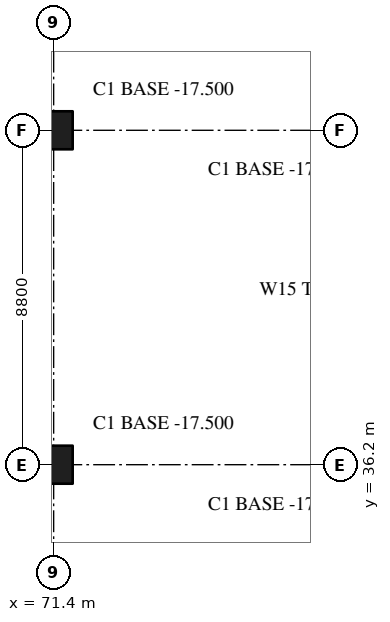
"""IFC4 building model, lengths in metres.
Left out: names, types, materials, properties, quantities, classifications, styles, units other than length and angle.
Written with IfcOpenShell. Run it as: python <this file> out.ifc"""

import sys

from ifc_helpers import new_model, si_unit, direction, frame, origin, origin_2d, place, context, subcontext, project, spatial, rectangle, extrude, element, save


model = new_model("IFC4")
c1 = context("Model", 3, precision=1e-05, world=origin(), true_north=direction((0.0, 1.0)))
c2 = subcontext(c1, "Body", "Model", "MODEL_VIEW")
j1 = project(units=[si_unit("LENGTHUNIT", "METRE"), si_unit("PLANEANGLEUNIT", "RADIAN")], contexts=[c1])
p1 = place(None, origin())
s1 = spatial("IfcSite", under=j1, at=p1, CompositionType="ELEMENT")
p2 = place(p1, origin())
s2 = spatial("IfcBuilding", under=s1, at=p2, CompositionType="ELEMENT")
p3 = place(p2, frame((0.0, 0.0, -17.0)))
s3 = spatial("IfcBuildingStorey", under=s2, at=p3, CompositionType="ELEMENT", Elevation=-17.0)
for number, where, z_axis, x_axis in (
    (1, (71.4, 36.2, -0.5), (0.0, 0.0, 1.0), (1.0, 0.0, 0.0)),
    (2, (71.4, 45.0, -0.5), (0.0, 0.0, 1.0), (1.0, 0.0, 0.0)),
):
    element("IfcColumn", number, at=place(p3, frame(where, z_axis=z_axis, x_axis=x_axis)), inside=s3, PredefinedType="COLUMN", context=c2, shape_type="SweptSolid", body=[
        extrude(rectangle(XDim=1.0, YDim=1.0, at=origin_2d()), origin(), (0.0, 0.0, 1.0), 5.5),
    ])
save(model, sys.argv[1])
